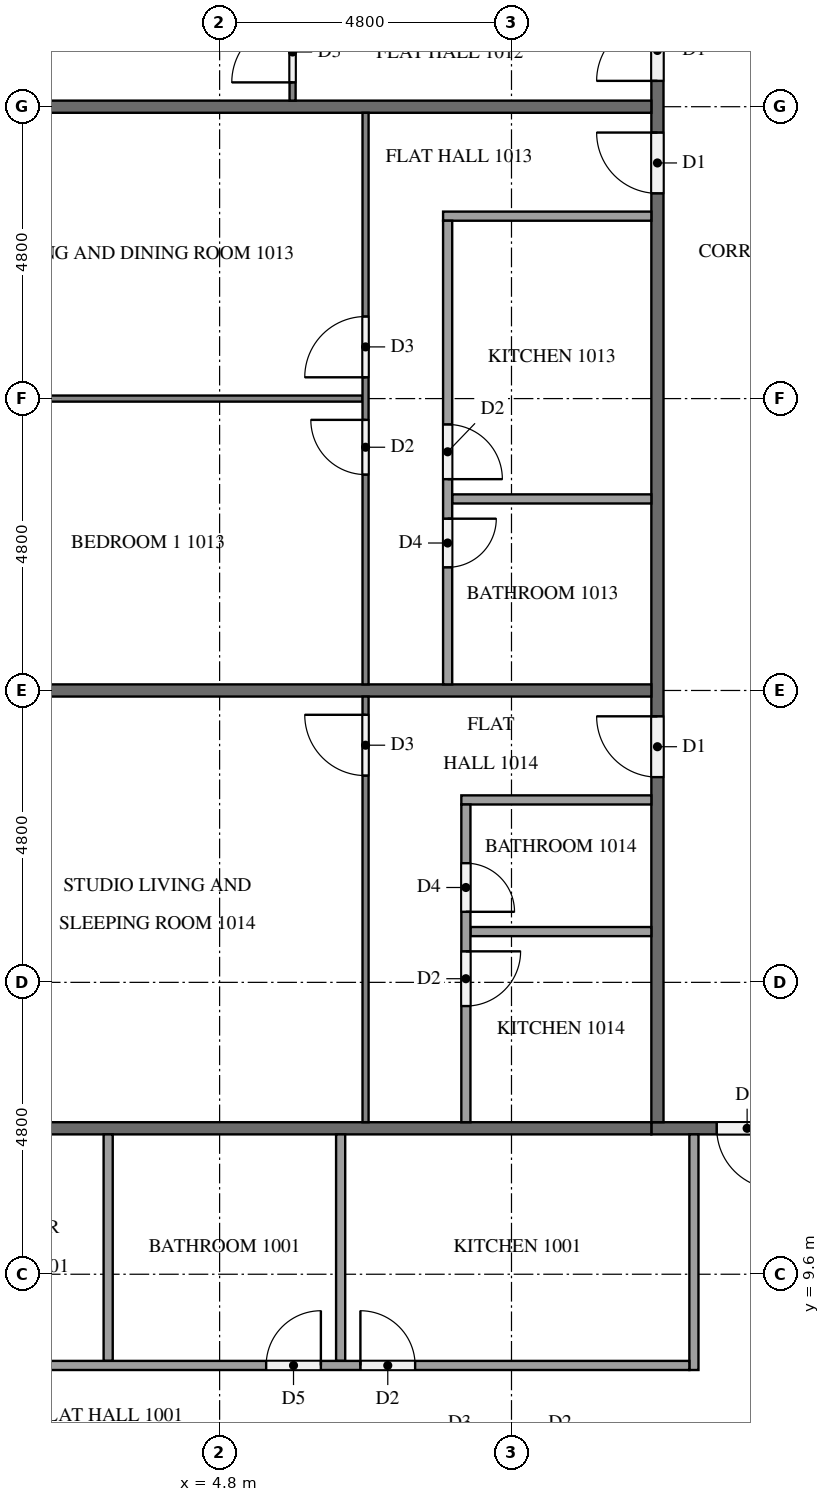
"""IFC4 building model, lengths in metres.
Left out: names, types, materials, properties, quantities, classifications, styles, units other than length and angle.
Written with IfcOpenShell. Run it as: python <this file> out.ifc"""

import sys

from ifc_helpers import new_model, si_unit, direction, frame, frame_2d, origin, place, context, subcontext, project, spatial, rectangle, extrude, element, fill, save


model = new_model("IFC4")
c1 = context("Model", 3, precision=1e-05, world=origin(), true_north=direction((0.0, 1.0)))
c2 = subcontext(c1, "Body", "Model", "MODEL_VIEW")
j1 = project(units=[si_unit("LENGTHUNIT", "METRE"), si_unit("PLANEANGLEUNIT", "RADIAN")], contexts=[c1])
p1 = place(None, origin())
s1 = spatial("IfcSite", under=j1, at=p1, CompositionType="ELEMENT")
p2 = place(p1, origin())
s2 = spatial("IfcBuilding", under=s1, at=p2, CompositionType="ELEMENT")
p3 = place(p2, frame((0.0, 0.0, 43.4)))
s3 = spatial("IfcBuildingStorey", under=s2, at=p3, CompositionType="ELEMENT", Elevation=43.4)
p4 = place(p3, frame((50.5, 12.0, 0.0), z_axis=(0.0, 0.0, 1.0), x_axis=(-1.0, 0.0, 0.0)))
e1 = element("IfcWall", 1, at=p4, inside=s3, PredefinedType="PARTITIONING", context=c2, shape_type="SweptSolid", body=[
    extrude(rectangle(XDim=38.6, YDim=0.2, at=frame_2d((19.3, 0.0))), origin(), (0.0, 0.0, 1.0), 3.2),
])
p5 = place(p4, frame((36.525, 0.0, 0.0)))
e2 = element("IfcOpeningElement", 2, at=p5, cuts=e1, PredefinedType="OPENING", context=c2, shape_type="SweptSolid", body=[
    extrude(rectangle(XDim=1.0, YDim=2.1, at=frame_2d((0.5, 1.05))), frame((0.0, 0.11, 0.0), z_axis=(0.0, -1.0, 0.0), x_axis=(1.0, 0.0, 0.0)), (0.0, 0.0, 1.0), 0.22),
])
p6 = place(p4, frame((24.525, 0.0, 0.0)))
e3 = element("IfcOpeningElement", 3, at=p6, cuts=e1, PredefinedType="OPENING", context=c2, shape_type="SweptSolid", body=[
    extrude(rectangle(XDim=1.0, YDim=2.1, at=frame_2d((0.5, 1.05))), frame((0.0, 0.11, 0.0), z_axis=(0.0, -1.0, 0.0), x_axis=(1.0, 0.0, 0.0)), (0.0, 0.0, 1.0), 0.22),
])
p7 = place(p4, frame((22.675, 0.0, 0.0)))
e4 = element("IfcOpeningElement", 4, at=p7, cuts=e1, PredefinedType="OPENING", context=c2, shape_type="SweptSolid", body=[
    extrude(rectangle(XDim=1.0, YDim=2.1, at=frame_2d((0.5, 1.05))), frame((0.0, 0.11, 0.0), z_axis=(0.0, -1.0, 0.0), x_axis=(1.0, 0.0, 0.0)), (0.0, 0.0, 1.0), 0.22),
])
p8 = place(p4, frame((8.275, 0.0, 0.0)))
e5 = element("IfcOpeningElement", 5, at=p8, cuts=e1, PredefinedType="OPENING", context=c2, shape_type="SweptSolid", body=[
    extrude(rectangle(XDim=1.0, YDim=2.1, at=frame_2d((0.5, 1.05))), frame((0.0, 0.11, 0.0), z_axis=(0.0, -1.0, 0.0), x_axis=(1.0, 0.0, 0.0)), (0.0, 0.0, 1.0), 0.22),
])
p9 = place(p3, frame((12.0, 12.1, 0.0), z_axis=(0.0, 0.0, 1.0), x_axis=(0.0, 1.0, 0.0)))
e6 = element("IfcWall", 6, at=p9, inside=s3, PredefinedType="PARTITIONING", context=c2, shape_type="SweptSolid", body=[
    extrude(rectangle(XDim=28.6, YDim=0.2, at=frame_2d((14.3, 0.0))), origin(), (0.0, 0.0, 1.0), 3.2),
])
p10 = place(p9, frame((26.725, 0.0, 0.0)))
e7 = element("IfcOpeningElement", 7, at=p10, cuts=e6, PredefinedType="OPENING", context=c2, shape_type="SweptSolid", body=[
    extrude(rectangle(XDim=1.0, YDim=2.1, at=frame_2d((0.5, 1.05))), frame((0.0, 0.11, 0.0), z_axis=(0.0, -1.0, 0.0), x_axis=(1.0, 0.0, 0.0)), (0.0, 0.0, 1.0), 0.22),
])
p11 = place(p9, frame((17.125, 0.0, 0.0)))
e8 = element("IfcOpeningElement", 8, at=p11, cuts=e6, PredefinedType="OPENING", context=c2, shape_type="SweptSolid", body=[
    extrude(rectangle(XDim=1.0, YDim=2.1, at=frame_2d((0.5, 1.05))), frame((0.0, 0.11, 0.0), z_axis=(0.0, -1.0, 0.0), x_axis=(1.0, 0.0, 0.0)), (0.0, 0.0, 1.0), 0.22),
])
p12 = place(p9, frame((15.275, 0.0, 0.0)))
e9 = element("IfcOpeningElement", 9, at=p12, cuts=e6, PredefinedType="OPENING", context=c2, shape_type="SweptSolid", body=[
    extrude(rectangle(XDim=1.0, YDim=2.1, at=frame_2d((0.5, 1.05))), frame((0.0, 0.11, 0.0), z_axis=(0.0, -1.0, 0.0), x_axis=(1.0, 0.0, 0.0)), (0.0, 0.0, 1.0), 0.22),
])
p13 = place(p9, frame((5.675, 0.0, 0.0)))
e10 = element("IfcOpeningElement", 10, at=p13, cuts=e6, PredefinedType="OPENING", context=c2, shape_type="SweptSolid", body=[
    extrude(rectangle(XDim=1.0, YDim=2.1, at=frame_2d((0.5, 1.05))), frame((0.0, 0.11, 0.0), z_axis=(0.0, -1.0, 0.0), x_axis=(1.0, 0.0, 0.0)), (0.0, 0.0, 1.0), 0.22),
])
for number, where, z_axis, x_axis in (
    (11, (0.1, 12.0, 0.0), (0.0, 0.0, 1.0), (1.0, 0.0, 0.0)),
    (12, (0.1, 28.8, 0.0), (0.0, 0.0, 1.0), (1.0, 0.0, 0.0)),
    (13, (0.1, 19.2, 0.0), (0.0, 0.0, 1.0), (1.0, 0.0, 0.0)),
):
    element("IfcWall", number, at=place(p3, frame(where, z_axis=z_axis, x_axis=x_axis)), inside=s3, PredefinedType="PARTITIONING", context=c2, shape_type="SweptSolid", body=[
        extrude(rectangle(XDim=11.8, YDim=0.2, at=frame_2d((5.9, 0.0))), origin(), (0.0, 0.0, 1.0), 3.2),
    ])
for number, where, z_axis, x_axis in (
    (14, (6.79, 11.9, 0.0), (0.0, 0.0, 1.0), (0.0, -1.0, 0.0)),
    (15, (2.967, 11.9, 0.0), (0.0, 0.0, 1.0), (0.0, -1.0, 0.0)),
):
    element("IfcWall", number, at=place(p3, frame(where, z_axis=z_axis, x_axis=x_axis)), inside=s3, PredefinedType="PARTITIONING", context=c2, shape_type="SweptSolid", body=[
        extrude(rectangle(XDim=3.725, YDim=0.15, at=frame_2d((1.862, 0.0))), origin(), (0.0, 0.0, 1.0), 3.2),
    ])
p14 = place(p3, frame((12.6, 11.9, 0.0), z_axis=(0.0, 0.0, 1.0), x_axis=(0.0, -1.0, 0.0)))
e16 = element("IfcWall", 16, at=p14, inside=s3, PredefinedType="PARTITIONING", context=c2, shape_type="SweptSolid", body=[
    extrude(rectangle(XDim=3.875, YDim=0.15, at=frame_2d((1.938, 0.0))), origin(), (0.0, 0.0, 1.0), 3.2),
])
p15 = place(p3, frame((0.1, 8.1, 0.0), z_axis=(0.0, 0.0, 1.0), x_axis=(1.0, 0.0, 0.0)))
e17 = element("IfcWall", 17, at=p15, inside=s3, PredefinedType="PARTITIONING", context=c2, shape_type="SweptSolid", body=[
    extrude(rectangle(XDim=12.425, YDim=0.15, at=frame_2d((6.212, 0.0))), origin(), (0.0, 0.0, 1.0), 3.2),
])
p16 = place(p15, frame((7.015, 0.0, 0.0)))
e18 = element("IfcOpeningElement", 18, at=p16, cuts=e17, PredefinedType="OPENING", context=c2, shape_type="SweptSolid", body=[
    extrude(rectangle(XDim=0.9, YDim=2.1, at=frame_2d((0.45, 1.05))), frame((0.0, 0.085, 0.0), z_axis=(0.0, -1.0, 0.0), x_axis=(1.0, 0.0, 0.0)), (0.0, 0.0, 1.0), 0.17),
])
p17 = place(p15, frame((5.465, 0.0, 0.0)))
e19 = element("IfcOpeningElement", 19, at=p17, cuts=e17, PredefinedType="OPENING", context=c2, shape_type="SweptSolid", body=[
    extrude(rectangle(XDim=0.9, YDim=2.1, at=frame_2d((0.45, 1.05))), frame((0.0, 0.085, 0.0), z_axis=(0.0, -1.0, 0.0), x_axis=(1.0, 0.0, 0.0)), (0.0, 0.0, 1.0), 0.17),
])
p18 = place(p15, frame((0.35, 0.0, 0.0)))
e20 = element("IfcOpeningElement", 20, at=p18, cuts=e17, PredefinedType="OPENING", context=c2, shape_type="SweptSolid", body=[
    extrude(rectangle(XDim=0.8, YDim=2.1, at=frame_2d((0.4, 1.05))), frame((0.0, 0.085, 0.0), z_axis=(0.0, -1.0, 0.0), x_axis=(1.0, 0.0, 0.0)), (0.0, 0.0, 1.0), 0.17),
])
p19 = place(p3, frame((6.0, 28.9, 0.0), z_axis=(0.0, 0.0, 1.0), x_axis=(0.0, 1.0, 0.0)))
e21 = element("IfcWall", 21, at=p19, inside=s3, PredefinedType="PARTITIONING", context=c2, shape_type="SweptSolid", body=[
    extrude(rectangle(XDim=9.4, YDim=0.1, at=frame_2d((4.7, 0.0))), origin(), (0.0, 0.0, 1.0), 3.2),
])
p20 = place(p19, frame((0.3, 0.0, 0.0)))
e22 = element("IfcOpeningElement", 22, at=p20, cuts=e21, PredefinedType="OPENING", context=c2, shape_type="SweptSolid", body=[
    extrude(rectangle(XDim=1.0, YDim=2.1, at=frame_2d((0.5, 1.05))), frame((0.0, 0.06, 0.0), z_axis=(0.0, -1.0, 0.0), x_axis=(1.0, 0.0, 0.0)), (0.0, 0.0, 1.0), 0.12),
])
p21 = place(p19, frame((8.2, 0.0, 0.0)))
e23 = element("IfcOpeningElement", 23, at=p21, cuts=e21, PredefinedType="OPENING", context=c2, shape_type="SweptSolid", body=[
    extrude(rectangle(XDim=0.9, YDim=2.1, at=frame_2d((0.45, 1.05))), frame((0.0, 0.06, 0.0), z_axis=(0.0, -1.0, 0.0), x_axis=(1.0, 0.0, 0.0)), (0.0, 0.0, 1.0), 0.12),
])
p22 = place(p3, frame((7.15, 24.0, 0.0), z_axis=(0.0, 0.0, 1.0), x_axis=(-1.0, 0.0, 0.0)))
e24 = element("IfcWall", 24, at=p22, inside=s3, PredefinedType="PARTITIONING", context=c2, shape_type="SweptSolid", body=[
    extrude(rectangle(XDim=6.7, YDim=0.1, at=frame_2d((3.35, 0.0))), origin(), (0.0, 0.0, 1.0), 3.2),
])
p23 = place(p3, frame((7.2, 19.3, 0.0), z_axis=(0.0, 0.0, 1.0), x_axis=(0.0, 1.0, 0.0)))
e25 = element("IfcWall", 25, at=p23, inside=s3, PredefinedType="PARTITIONING", context=c2, shape_type="SweptSolid", body=[
    extrude(rectangle(XDim=9.4, YDim=0.1, at=frame_2d((4.7, 0.0))), origin(), (0.0, 0.0, 1.0), 3.2),
])
p24 = place(p23, frame((5.05, 0.0, 0.0)))
e26 = element("IfcOpeningElement", 26, at=p24, cuts=e25, PredefinedType="OPENING", context=c2, shape_type="SweptSolid", body=[
    extrude(rectangle(XDim=1.0, YDim=2.1, at=frame_2d((0.5, 1.05))), frame((0.0, 0.06, 0.0), z_axis=(0.0, -1.0, 0.0), x_axis=(1.0, 0.0, 0.0)), (0.0, 0.0, 1.0), 0.12),
])
p25 = place(p23, frame((3.45, 0.0, 0.0)))
e27 = element("IfcOpeningElement", 27, at=p25, cuts=e25, PredefinedType="OPENING", context=c2, shape_type="SweptSolid", body=[
    extrude(rectangle(XDim=0.9, YDim=2.1, at=frame_2d((0.45, 1.05))), frame((0.0, 0.06, 0.0), z_axis=(0.0, -1.0, 0.0), x_axis=(1.0, 0.0, 0.0)), (0.0, 0.0, 1.0), 0.12),
])
p26 = place(p3, frame((11.9, 22.35, 0.0), z_axis=(0.0, 0.0, 1.0), x_axis=(-1.0, 0.0, 0.0)))
e28 = element("IfcWall", 28, at=p26, inside=s3, PredefinedType="PARTITIONING", context=c2, shape_type="SweptSolid", body=[
    extrude(rectangle(XDim=3.275, YDim=0.15, at=frame_2d((1.637, 0.0))), origin(), (0.0, 0.0, 1.0), 3.2),
])
p27 = place(p3, frame((11.9, 27.0, 0.0), z_axis=(0.0, 0.0, 1.0), x_axis=(-1.0, 0.0, 0.0)))
e29 = element("IfcWall", 29, at=p27, inside=s3, PredefinedType="PARTITIONING", context=c2, shape_type="SweptSolid", body=[
    extrude(rectangle(XDim=3.425, YDim=0.15, at=frame_2d((1.712, 0.0))), origin(), (0.0, 0.0, 1.0), 3.2),
])
p28 = place(p3, frame((8.55, 26.925, 0.0), z_axis=(0.0, 0.0, 1.0), x_axis=(0.0, -1.0, 0.0)))
e30 = element("IfcWall", 30, at=p28, inside=s3, PredefinedType="PARTITIONING", context=c2, shape_type="SweptSolid", body=[
    extrude(rectangle(XDim=7.625, YDim=0.15, at=frame_2d((3.812, 0.0))), origin(), (0.0, 0.0, 1.0), 3.2),
])
p29 = place(p28, frame((3.35, 0.0, 0.0)))
e31 = element("IfcOpeningElement", 31, at=p29, cuts=e30, PredefinedType="OPENING", context=c2, shape_type="SweptSolid", body=[
    extrude(rectangle(XDim=0.9, YDim=2.1, at=frame_2d((0.45, 1.05))), frame((0.0, 0.085, 0.0), z_axis=(0.0, -1.0, 0.0), x_axis=(1.0, 0.0, 0.0)), (0.0, 0.0, 1.0), 0.17),
])
p30 = place(p28, frame((4.9, 0.0, 0.0)))
e32 = element("IfcOpeningElement", 32, at=p30, cuts=e30, PredefinedType="OPENING", context=c2, shape_type="SweptSolid", body=[
    extrude(rectangle(XDim=0.8, YDim=2.1, at=frame_2d((0.4, 1.05))), frame((0.0, 0.085, 0.0), z_axis=(0.0, -1.0, 0.0), x_axis=(1.0, 0.0, 0.0)), (0.0, 0.0, 1.0), 0.17),
])
p31 = place(p3, frame((7.2, 12.1, 0.0), z_axis=(0.0, 0.0, 1.0), x_axis=(0.0, 1.0, 0.0)))
e33 = element("IfcWall", 33, at=p31, inside=s3, PredefinedType="PARTITIONING", context=c2, shape_type="SweptSolid", body=[
    extrude(rectangle(XDim=7.0, YDim=0.1, at=frame_2d((3.5, 0.0))), origin(), (0.0, 0.0, 1.0), 3.2),
])
p32 = place(p31, frame((5.7, 0.0, 0.0)))
e34 = element("IfcOpeningElement", 34, at=p32, cuts=e33, PredefinedType="OPENING", context=c2, shape_type="SweptSolid", body=[
    extrude(rectangle(XDim=1.0, YDim=2.1, at=frame_2d((0.5, 1.05))), frame((0.0, 0.06, 0.0), z_axis=(0.0, -1.0, 0.0), x_axis=(1.0, 0.0, 0.0)), (0.0, 0.0, 1.0), 0.12),
])
p33 = place(p3, frame((11.9, 15.235, 0.0), z_axis=(0.0, 0.0, 1.0), x_axis=(-1.0, 0.0, 0.0)))
e35 = element("IfcWall", 35, at=p33, inside=s3, PredefinedType="PARTITIONING", context=c2, shape_type="SweptSolid", body=[
    extrude(rectangle(XDim=2.975, YDim=0.15, at=frame_2d((1.487, 0.0))), origin(), (0.0, 0.0, 1.0), 3.2),
])
p34 = place(p3, frame((11.9, 17.4, 0.0), z_axis=(0.0, 0.0, 1.0), x_axis=(-1.0, 0.0, 0.0)))
e36 = element("IfcWall", 36, at=p34, inside=s3, PredefinedType="PARTITIONING", context=c2, shape_type="SweptSolid", body=[
    extrude(rectangle(XDim=3.125, YDim=0.15, at=frame_2d((1.562, 0.0))), origin(), (0.0, 0.0, 1.0), 3.2),
])
p35 = place(p3, frame((8.85, 17.325, 0.0), z_axis=(0.0, 0.0, 1.0), x_axis=(0.0, -1.0, 0.0)))
e37 = element("IfcWall", 37, at=p35, inside=s3, PredefinedType="PARTITIONING", context=c2, shape_type="SweptSolid", body=[
    extrude(rectangle(XDim=5.225, YDim=0.15, at=frame_2d((2.612, 0.0))), origin(), (0.0, 0.0, 1.0), 3.2),
])
p36 = place(p35, frame((0.965, 0.0, 0.0)))
e38 = element("IfcOpeningElement", 38, at=p36, cuts=e37, PredefinedType="OPENING", context=c2, shape_type="SweptSolid", body=[
    extrude(rectangle(XDim=0.8, YDim=2.1, at=frame_2d((0.4, 1.05))), frame((0.0, 0.085, 0.0), z_axis=(0.0, -1.0, 0.0), x_axis=(1.0, 0.0, 0.0)), (0.0, 0.0, 1.0), 0.17),
])
p37 = place(p35, frame((2.415, 0.0, 0.0)))
e39 = element("IfcOpeningElement", 39, at=p37, cuts=e37, PredefinedType="OPENING", context=c2, shape_type="SweptSolid", body=[
    extrude(rectangle(XDim=0.9, YDim=2.1, at=frame_2d((0.45, 1.05))), frame((0.0, 0.085, 0.0), z_axis=(0.0, -1.0, 0.0), x_axis=(1.0, 0.0, 0.0)), (0.0, 0.0, 1.0), 0.17),
])
p38 = place(p5, origin())
e40 = element("IfcDoor", 40, at=p38, inside=s3, OperationType="SINGLE_SWING_LEFT", PredefinedType="DOOR", context=c2, shape_type="SweptSolid", body=[
    extrude(rectangle(XDim=1.0, YDim=2.1, at=frame_2d((0.5, 1.05))), frame((0.0, 0.025, 0.0), z_axis=(0.0, -1.0, 0.0), x_axis=(1.0, 0.0, 0.0)), (0.0, 0.0, 1.0), 0.05),
])
fill(e2, e40)
p39 = place(p11, origin())
e41 = element("IfcDoor", 41, at=p39, inside=s3, OperationType="SINGLE_SWING_LEFT", PredefinedType="DOOR", context=c2, shape_type="SweptSolid", body=[
    extrude(rectangle(XDim=1.0, YDim=2.1, at=frame_2d((0.5, 1.05))), frame((0.0, 0.025, 0.0), z_axis=(0.0, -1.0, 0.0), x_axis=(1.0, 0.0, 0.0)), (0.0, 0.0, 1.0), 0.05),
])
fill(e8, e41)
p40 = place(p12, origin())
e42 = element("IfcDoor", 42, at=p40, inside=s3, OperationType="SINGLE_SWING_RIGHT", PredefinedType="DOOR", context=c2, shape_type="SweptSolid", body=[
    extrude(rectangle(XDim=1.0, YDim=2.1, at=frame_2d((0.5, 1.05))), frame((0.0, 0.025, 0.0), z_axis=(0.0, -1.0, 0.0), x_axis=(1.0, 0.0, 0.0)), (0.0, 0.0, 1.0), 0.05),
])
fill(e9, e42)
p41 = place(p13, origin())
e43 = element("IfcDoor", 43, at=p41, inside=s3, OperationType="SINGLE_SWING_RIGHT", PredefinedType="DOOR", context=c2, shape_type="SweptSolid", body=[
    extrude(rectangle(XDim=1.0, YDim=2.1, at=frame_2d((0.5, 1.05))), frame((0.0, 0.025, 0.0), z_axis=(0.0, -1.0, 0.0), x_axis=(1.0, 0.0, 0.0)), (0.0, 0.0, 1.0), 0.05),
])
fill(e10, e43)
p42 = place(p16, origin())
e44 = element("IfcDoor", 44, at=p42, inside=s3, OperationType="SINGLE_SWING_LEFT", PredefinedType="DOOR", context=c2, shape_type="SweptSolid", body=[
    extrude(rectangle(XDim=0.9, YDim=2.1, at=frame_2d((0.45, 1.05))), frame((0.0, 0.025, 0.0), z_axis=(0.0, -1.0, 0.0), x_axis=(1.0, 0.0, 0.0)), (0.0, 0.0, 1.0), 0.05),
])
fill(e18, e44)
p43 = place(p17, origin())
e45 = element("IfcDoor", 45, at=p43, inside=s3, OperationType="SINGLE_SWING_RIGHT", PredefinedType="DOOR", context=c2, shape_type="SweptSolid", body=[
    extrude(rectangle(XDim=0.9, YDim=2.1, at=frame_2d((0.45, 1.05))), frame((0.0, 0.025, 0.0), z_axis=(0.0, -1.0, 0.0), x_axis=(1.0, 0.0, 0.0)), (0.0, 0.0, 1.0), 0.05),
])
fill(e19, e45)
p44 = place(p20, origin())
e46 = element("IfcDoor", 46, at=p44, inside=s3, OperationType="SINGLE_SWING_LEFT", PredefinedType="DOOR", context=c2, shape_type="SweptSolid", body=[
    extrude(rectangle(XDim=1.0, YDim=2.1, at=frame_2d((0.5, 1.05))), frame((0.0, 0.025, 0.0), z_axis=(0.0, -1.0, 0.0), x_axis=(1.0, 0.0, 0.0)), (0.0, 0.0, 1.0), 0.05),
])
fill(e22, e46)
p45 = place(p24, origin())
e47 = element("IfcDoor", 47, at=p45, inside=s3, OperationType="SINGLE_SWING_LEFT", PredefinedType="DOOR", context=c2, shape_type="SweptSolid", body=[
    extrude(rectangle(XDim=1.0, YDim=2.1, at=frame_2d((0.5, 1.05))), frame((0.0, 0.025, 0.0), z_axis=(0.0, -1.0, 0.0), x_axis=(1.0, 0.0, 0.0)), (0.0, 0.0, 1.0), 0.05),
])
fill(e26, e47)
p46 = place(p25, origin())
e48 = element("IfcDoor", 48, at=p46, inside=s3, OperationType="SINGLE_SWING_RIGHT", PredefinedType="DOOR", context=c2, shape_type="SweptSolid", body=[
    extrude(rectangle(XDim=0.9, YDim=2.1, at=frame_2d((0.45, 1.05))), frame((0.0, 0.025, 0.0), z_axis=(0.0, -1.0, 0.0), x_axis=(1.0, 0.0, 0.0)), (0.0, 0.0, 1.0), 0.05),
])
fill(e27, e48)
p47 = place(p29, origin())
e49 = element("IfcDoor", 49, at=p47, inside=s3, OperationType="SINGLE_SWING_RIGHT", PredefinedType="DOOR", context=c2, shape_type="SweptSolid", body=[
    extrude(rectangle(XDim=0.9, YDim=2.1, at=frame_2d((0.45, 1.05))), frame((0.0, 0.025, 0.0), z_axis=(0.0, -1.0, 0.0), x_axis=(1.0, 0.0, 0.0)), (0.0, 0.0, 1.0), 0.05),
])
fill(e31, e49)
p48 = place(p30, origin())
e50 = element("IfcDoor", 50, at=p48, inside=s3, OperationType="SINGLE_SWING_LEFT", PredefinedType="DOOR", context=c2, shape_type="SweptSolid", body=[
    extrude(rectangle(XDim=0.8, YDim=2.1, at=frame_2d((0.4, 1.05))), frame((0.0, 0.025, 0.0), z_axis=(0.0, -1.0, 0.0), x_axis=(1.0, 0.0, 0.0)), (0.0, 0.0, 1.0), 0.05),
])
fill(e32, e50)
p49 = place(p32, origin())
e51 = element("IfcDoor", 51, at=p49, inside=s3, OperationType="SINGLE_SWING_RIGHT", PredefinedType="DOOR", context=c2, shape_type="SweptSolid", body=[
    extrude(rectangle(XDim=1.0, YDim=2.1, at=frame_2d((0.5, 1.05))), frame((0.0, 0.025, 0.0), z_axis=(0.0, -1.0, 0.0), x_axis=(1.0, 0.0, 0.0)), (0.0, 0.0, 1.0), 0.05),
])
fill(e34, e51)
p50 = place(p36, origin())
e52 = element("IfcDoor", 52, at=p50, inside=s3, OperationType="SINGLE_SWING_RIGHT", PredefinedType="DOOR", context=c2, shape_type="SweptSolid", body=[
    extrude(rectangle(XDim=0.8, YDim=2.1, at=frame_2d((0.4, 1.05))), frame((0.0, 0.025, 0.0), z_axis=(0.0, -1.0, 0.0), x_axis=(1.0, 0.0, 0.0)), (0.0, 0.0, 1.0), 0.05),
])
fill(e38, e52)
p51 = place(p37, origin())
e53 = element("IfcDoor", 53, at=p51, inside=s3, OperationType="SINGLE_SWING_LEFT", PredefinedType="DOOR", context=c2, shape_type="SweptSolid", body=[
    extrude(rectangle(XDim=0.9, YDim=2.1, at=frame_2d((0.45, 1.05))), frame((0.0, 0.025, 0.0), z_axis=(0.0, -1.0, 0.0), x_axis=(1.0, 0.0, 0.0)), (0.0, 0.0, 1.0), 0.05),
])
fill(e39, e53)
save(model, sys.argv[1])
